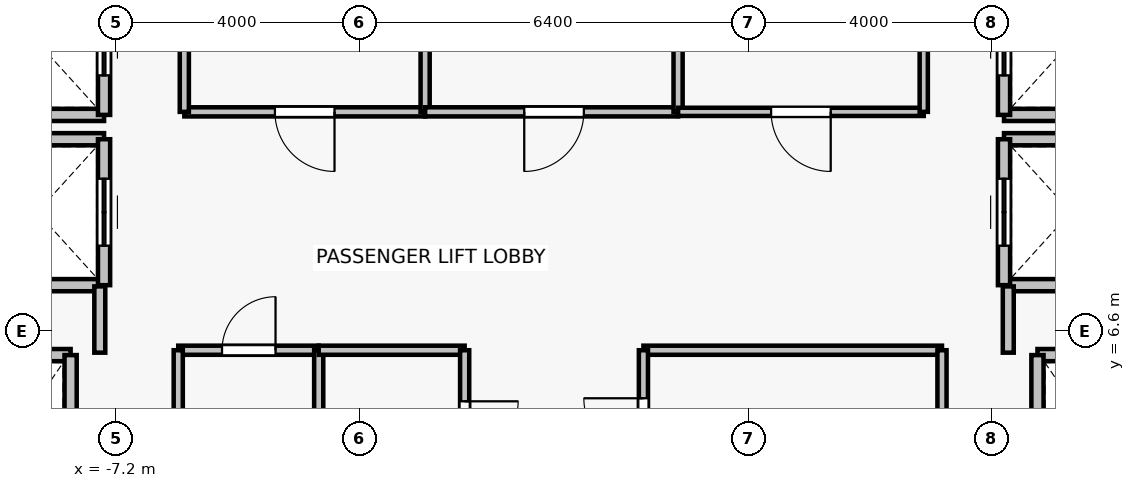
"""IFC4 building model, lengths in metres.
Left out: names, types, materials, properties, quantities, classifications, styles, units other than length and angle.
Written with IfcOpenShell. Run it as: python <this file> out.ifc"""

import sys

from ifc_helpers import new_model, si_unit, direction, frame, frame_2d, origin, place, context, subcontext, project, spatial, rectangle, extrude, source, transform, mapped, element, fill, save


model = new_model("IFC4")
c1 = context("Model", 3, precision=1e-05, world=origin(), true_north=direction((0.0, 1.0)))
c2 = subcontext(c1, "Body", "Model", "MODEL_VIEW")
j1 = project(units=[si_unit("LENGTHUNIT", "METRE"), si_unit("PLANEANGLEUNIT", "RADIAN")], contexts=[c1])
p1 = place(None, origin())
s1 = spatial("IfcSite", under=j1, at=p1, CompositionType="ELEMENT")
p2 = place(p1, origin())
s2 = spatial("IfcBuilding", under=s1, at=p2, CompositionType="ELEMENT")
p3 = place(p2, frame((0.0, 0.0, 241.9)))
s3 = spatial("IfcBuildingStorey", under=s2, at=p3, CompositionType="ELEMENT", Elevation=241.9)
p4 = place(p3, frame((-9.95, 6.2, 0.0), z_axis=(0.0, 0.0, 1.0), x_axis=(1.0, 0.0, 0.0)))
e1 = element("IfcWall", 1, at=p4, inside=s3, PredefinedType="SOLIDWALL", context=c2, shape_type="SweptSolid", body=[
    extrude(rectangle(XDim=2.0, YDim=0.2, at=frame_2d((1.0, 0.0))), origin(), (0.0, 0.0, 1.0), 3.075),
])
p5 = place(p3, frame((-7.95, 6.2, 0.0), z_axis=(0.0, 0.0, 1.0), x_axis=(0.0, -1.0, 0.0)))
e2 = element("IfcWall", 2, at=p5, inside=s3, PredefinedType="SOLIDWALL", context=c2, shape_type="SweptSolid", body=[
    extrude(rectangle(XDim=2.8, YDim=0.2, at=frame_2d((1.4, 0.0))), origin(), (0.0, 0.0, 1.0), 3.075),
])
p6 = place(p3, frame((7.95, 6.2, 0.0), z_axis=(0.0, 0.0, 1.0), x_axis=(1.0, 0.0, 0.0)))
e3 = element("IfcWall", 3, at=p6, inside=s3, PredefinedType="SOLIDWALL", context=c2, shape_type="SweptSolid", body=[
    extrude(rectangle(XDim=2.0, YDim=0.2, at=frame_2d((1.0, 0.0))), origin(), (0.0, 0.0, 1.0), 3.075),
])
p7 = place(p3, frame((7.95, 3.4, 0.0), z_axis=(0.0, 0.0, 1.0), x_axis=(0.0, 1.0, 0.0)))
e4 = element("IfcWall", 4, at=p7, inside=s3, PredefinedType="SOLIDWALL", context=c2, shape_type="SweptSolid", body=[
    extrude(rectangle(XDim=2.8, YDim=0.2, at=frame_2d((1.4, 0.0))), origin(), (0.0, 0.0, 1.0), 3.075),
])
for number, where, z_axis, x_axis in (
    (5, (-7.4, 7.35, 0.0), (0.0, 0.0, 1.0), (-1.0, 0.0, 0.0)),
    (6, (-9.6, 9.75, 0.0), (0.0, 0.0, 1.0), (1.0, 0.0, 0.0)),
):
    element("IfcWall", number, at=place(p3, frame(where, z_axis=z_axis, x_axis=x_axis)), inside=s3, PredefinedType="SOLIDWALL", context=c2, shape_type="SweptSolid", body=[
        extrude(rectangle(XDim=2.2, YDim=0.2, at=frame_2d((1.1, 0.0))), origin(), (0.0, 0.0, 1.0), 2.615),
    ])
p8 = place(p3, frame((-7.4, 9.75, 0.0), z_axis=(0.0, 0.0, 1.0), x_axis=(0.0, -1.0, 0.0)))
e7 = element("IfcWall", 7, at=p8, inside=s3, PredefinedType="SOLIDWALL", context=c2, shape_type="SweptSolid", body=[
    extrude(rectangle(XDim=2.4, YDim=0.2, at=frame_2d((1.2, 0.0))), origin(), (0.0, 0.0, 1.0), 2.615),
])
p9 = place(p8, frame((0.65, 0.0, 0.0)))
e8 = element("IfcOpeningElement", 8, at=p9, cuts=e7, PredefinedType="OPENING", context=c2, shape_type="SweptSolid", body=[
    extrude(rectangle(XDim=1.1, YDim=2.2, at=frame_2d((0.55, 1.1))), frame((0.0, 0.11, 0.0), z_axis=(0.0, -1.0, 0.0), x_axis=(1.0, 0.0, 0.0)), (0.0, 0.0, 1.0), 0.22),
])
p10 = place(p3, frame((-7.4, 10.15, 0.0), z_axis=(0.0, 0.0, 1.0), x_axis=(-1.0, 0.0, 0.0)))
e9 = element("IfcWall", 9, at=p10, inside=s3, PredefinedType="SOLIDWALL", context=c2, shape_type="SweptSolid", body=[
    extrude(rectangle(XDim=2.2, YDim=0.2, at=frame_2d((1.1, 0.0))), origin(), (0.0, 0.0, 1.0), 2.615),
])
p11 = place(p3, frame((-7.4, 12.55, 0.0), z_axis=(0.0, 0.0, 1.0), x_axis=(0.0, -1.0, 0.0)))
e10 = element("IfcWall", 10, at=p11, inside=s3, PredefinedType="SOLIDWALL", context=c2, shape_type="SweptSolid", body=[
    extrude(rectangle(XDim=2.4, YDim=0.2, at=frame_2d((1.2, 0.0))), origin(), (0.0, 0.0, 1.0), 2.615),
])
p12 = place(p11, frame((0.65, 0.0, 0.0)))
e11 = element("IfcOpeningElement", 11, at=p12, cuts=e10, PredefinedType="OPENING", context=c2, shape_type="SweptSolid", body=[
    extrude(rectangle(XDim=1.1, YDim=2.2, at=frame_2d((0.55, 1.1))), frame((0.0, 0.11, 0.0), z_axis=(0.0, -1.0, 0.0), x_axis=(1.0, 0.0, 0.0)), (0.0, 0.0, 1.0), 0.22),
])
for number, where, z_axis, x_axis in (
    (12, (9.6, 7.35, 0.0), (0.0, 0.0, 1.0), (-1.0, 0.0, 0.0)),
    (13, (7.4, 9.75, 0.0), (0.0, 0.0, 1.0), (1.0, 0.0, 0.0)),
):
    element("IfcWall", number, at=place(p3, frame(where, z_axis=z_axis, x_axis=x_axis)), inside=s3, PredefinedType="SOLIDWALL", context=c2, shape_type="SweptSolid", body=[
        extrude(rectangle(XDim=2.2, YDim=0.2, at=frame_2d((1.1, 0.0))), origin(), (0.0, 0.0, 1.0), 2.615),
    ])
p13 = place(p3, frame((7.4, 7.35, 0.0), z_axis=(0.0, 0.0, 1.0), x_axis=(0.0, 1.0, 0.0)))
e14 = element("IfcWall", 14, at=p13, inside=s3, PredefinedType="SOLIDWALL", context=c2, shape_type="SweptSolid", body=[
    extrude(rectangle(XDim=2.4, YDim=0.2, at=frame_2d((1.2, 0.0))), origin(), (0.0, 0.0, 1.0), 2.615),
])
p14 = place(p13, frame((0.65, 0.0, 0.0)))
e15 = element("IfcOpeningElement", 15, at=p14, cuts=e14, PredefinedType="OPENING", context=c2, shape_type="SweptSolid", body=[
    extrude(rectangle(XDim=1.1, YDim=2.2, at=frame_2d((0.55, 1.1))), frame((0.0, 0.11, 0.0), z_axis=(0.0, -1.0, 0.0), x_axis=(1.0, 0.0, 0.0)), (0.0, 0.0, 1.0), 0.22),
])
p15 = place(p3, frame((9.6, 10.15, 0.0), z_axis=(0.0, 0.0, 1.0), x_axis=(-1.0, 0.0, 0.0)))
e16 = element("IfcWall", 16, at=p15, inside=s3, PredefinedType="SOLIDWALL", context=c2, shape_type="SweptSolid", body=[
    extrude(rectangle(XDim=2.2, YDim=0.2, at=frame_2d((1.1, 0.0))), origin(), (0.0, 0.0, 1.0), 2.615),
])
p16 = place(p3, frame((7.4, 10.15, 0.0), z_axis=(0.0, 0.0, 1.0), x_axis=(0.0, 1.0, 0.0)))
e17 = element("IfcWall", 17, at=p16, inside=s3, PredefinedType="SOLIDWALL", context=c2, shape_type="SweptSolid", body=[
    extrude(rectangle(XDim=2.4, YDim=0.2, at=frame_2d((1.2, 0.0))), origin(), (0.0, 0.0, 1.0), 2.615),
])
p17 = place(p16, frame((0.65, 0.0, 0.0)))
e18 = element("IfcOpeningElement", 18, at=p17, cuts=e17, PredefinedType="OPENING", context=c2, shape_type="SweptSolid", body=[
    extrude(rectangle(XDim=1.1, YDim=2.2, at=frame_2d((0.55, 1.1))), frame((0.0, 0.11, 0.0), z_axis=(0.0, -1.0, 0.0), x_axis=(1.0, 0.0, 0.0)), (0.0, 0.0, 1.0), 0.22),
])
for number, where, z_axis, x_axis in (
    (19, (-7.47, 7.33, 0.0), (0.0, 0.0, 1.0), (0.0, -1.0, 0.0)),
    (20, (7.47, 6.24, 0.0), (0.0, 0.0, 1.0), (0.0, 1.0, 0.0)),
):
    element("IfcWall", number, at=place(p3, frame(where, z_axis=z_axis, x_axis=x_axis)), inside=s3, PredefinedType="PARTITIONING", context=c2, shape_type="SweptSolid", body=[
        extrude(rectangle(XDim=1.09, YDim=0.18, at=frame_2d((0.545, 0.0))), origin(), (0.0, 0.0, 1.0), 2.615),
    ])
p18 = place(p3, frame((-2.12, 10.2, 0.0), z_axis=(0.0, 0.0, 1.0), x_axis=(-1.0, 0.0, 0.0)))
e21 = element("IfcWall", 21, at=p18, inside=s3, PredefinedType="PARTITIONING", context=c2, shape_type="SweptSolid", body=[
    extrude(rectangle(XDim=3.96, YDim=0.15, at=frame_2d((1.98, 0.0))), origin(), (0.0, 0.0, 1.0), 3.075),
])
p19 = place(p18, frame((1.49, 0.0, 0.0)))
e22 = element("IfcOpeningElement", 22, at=p19, cuts=e21, PredefinedType="OPENING", context=c2, shape_type="SweptSolid", body=[
    extrude(rectangle(XDim=0.98, YDim=2.15, at=frame_2d((0.49, 1.075))), frame((0.0, 0.085, 0.0), z_axis=(0.0, -1.0, 0.0), x_axis=(1.0, 0.0, 0.0)), (0.0, 0.0, 1.0), 0.17),
])
for number, where, z_axis, x_axis in (
    (23, (-6.08, 10.2, 0.0), (0.0, 0.0, 1.0), (0.0, 1.0, 0.0)),
    (24, (-2.12, 13.0, 0.0), (0.0, 0.0, 1.0), (0.0, -1.0, 0.0)),
):
    element("IfcWall", number, at=place(p3, frame(where, z_axis=z_axis, x_axis=x_axis)), inside=s3, PredefinedType="PARTITIONING", context=c2, shape_type="SweptSolid", body=[
        extrude(rectangle(XDim=2.8, YDim=0.15, at=frame_2d((1.4, 0.0))), origin(), (0.0, 0.0, 1.0), 3.075),
    ])
p20 = place(p3, frame((2.04, 10.2, 0.0), z_axis=(0.0, 0.0, 1.0), x_axis=(-1.0, 0.0, 0.0)))
e25 = element("IfcWall", 25, at=p20, inside=s3, PredefinedType="PARTITIONING", context=c2, shape_type="SweptSolid", body=[
    extrude(rectangle(XDim=4.16, YDim=0.15, at=frame_2d((2.08, 0.0))), origin(), (0.0, 0.0, 1.0), 3.075),
])
p21 = place(p20, frame((1.55, 0.0, 0.0)))
e26 = element("IfcOpeningElement", 26, at=p21, cuts=e25, PredefinedType="OPENING", context=c2, shape_type="SweptSolid", body=[
    extrude(rectangle(XDim=0.98, YDim=2.15, at=frame_2d((0.49, 1.075))), frame((0.0, 0.085, 0.0), z_axis=(0.0, -1.0, 0.0), x_axis=(1.0, 0.0, 0.0)), (0.0, 0.0, 1.0), 0.17),
])
p22 = place(p3, frame((2.04, 13.0, 0.0), z_axis=(0.0, 0.0, 1.0), x_axis=(0.0, -1.0, 0.0)))
e27 = element("IfcWall", 27, at=p22, inside=s3, PredefinedType="PARTITIONING", context=c2, shape_type="SweptSolid", body=[
    extrude(rectangle(XDim=2.8, YDim=0.15, at=frame_2d((1.4, 0.0))), origin(), (0.0, 0.0, 1.0), 3.075),
])
p23 = place(p3, frame((6.08, 10.2, 0.0), z_axis=(0.0, 0.0, 1.0), x_axis=(-1.0, 0.0, 0.0)))
e28 = element("IfcWall", 28, at=p23, inside=s3, PredefinedType="PARTITIONING", context=c2, shape_type="SweptSolid", body=[
    extrude(rectangle(XDim=4.04, YDim=0.135, at=frame_2d((2.02, 0.0))), origin(), (0.0, 0.0, 1.0), 3.075),
])
p24 = place(p23, frame((1.53, 0.0, 0.0)))
e29 = element("IfcOpeningElement", 29, at=p24, cuts=e28, PredefinedType="OPENING", context=c2, shape_type="SweptSolid", body=[
    extrude(rectangle(XDim=0.98, YDim=2.15, at=frame_2d((0.49, 1.075))), frame((0.0, 0.077, 0.0), z_axis=(0.0, -1.0, 0.0), x_axis=(1.0, 0.0, 0.0)), (0.0, 0.0, 1.0), 0.155),
])
p25 = place(p3, frame((6.08, 13.0, 0.0), z_axis=(0.0, 0.0, 1.0), x_axis=(0.0, -1.0, 0.0)))
e30 = element("IfcWall", 30, at=p25, inside=s3, PredefinedType="PARTITIONING", context=c2, shape_type="SweptSolid", body=[
    extrude(rectangle(XDim=2.8, YDim=0.135, at=frame_2d((1.4, 0.0))), origin(), (0.0, 0.0, 1.0), 3.075),
])
p26 = place(p3, frame((-6.18, 6.28, 0.0), z_axis=(0.0, 0.0, 1.0), x_axis=(1.0, 0.0, 0.0)))
e31 = element("IfcWall", 31, at=p26, inside=s3, PredefinedType="PARTITIONING", context=c2, shape_type="SweptSolid", body=[
    extrude(rectangle(XDim=2.31, YDim=0.15, at=frame_2d((1.155, 0.0))), origin(), (0.0, 0.0, 1.0), 3.075),
])
p27 = place(p26, frame((0.72, 0.0, 0.0)))
e32 = element("IfcOpeningElement", 32, at=p27, cuts=e31, PredefinedType="OPENING", context=c2, shape_type="SweptSolid", body=[
    extrude(rectangle(XDim=0.88, YDim=2.1, at=frame_2d((0.44, 1.05))), frame((0.0, 0.085, 0.0), z_axis=(0.0, -1.0, 0.0), x_axis=(1.0, 0.0, 0.0)), (0.0, 0.0, 1.0), 0.17),
])
for number, where, z_axis, x_axis in (
    (33, (-6.18, 3.76, 0.0), (0.0, 0.0, 1.0), (0.0, 1.0, 0.0)),
    (34, (-3.87, 6.28, 0.0), (0.0, 0.0, 1.0), (0.0, -1.0, 0.0)),
):
    element("IfcWall", number, at=place(p3, frame(where, z_axis=z_axis, x_axis=x_axis)), inside=s3, PredefinedType="PARTITIONING", context=c2, shape_type="SweptSolid", body=[
        extrude(rectangle(XDim=2.52, YDim=0.15, at=frame_2d((1.26, 0.0))), origin(), (0.0, 0.0, 1.0), 3.075),
    ])
p28 = place(p3, frame((-3.87, 6.28, 0.0), z_axis=(0.0, 0.0, 1.0), x_axis=(1.0, 0.0, 0.0)))
e35 = element("IfcWall", 35, at=p28, inside=s3, PredefinedType="PARTITIONING", context=c2, shape_type="SweptSolid", body=[
    extrude(rectangle(XDim=2.4, YDim=0.15, at=frame_2d((1.2, 0.0))), origin(), (0.0, 0.0, 1.0), 3.075),
])
p29 = place(p3, frame((-1.47, 6.28, 0.0), z_axis=(0.0, 0.0, 1.0), x_axis=(0.0, -1.0, 0.0)))
e36 = element("IfcWall", 36, at=p29, inside=s3, PredefinedType="PARTITIONING", context=c2, shape_type="SweptSolid", body=[
    extrude(rectangle(XDim=2.52, YDim=0.15, at=frame_2d((1.26, 0.0))), origin(), (0.0, 0.0, 1.0), 3.075),
])
p30 = place(p29, frame((0.84, 0.0, 0.0)))
e37 = element("IfcOpeningElement", 37, at=p30, cuts=e36, PredefinedType="OPENING", context=c2, shape_type="SweptSolid", body=[
    extrude(rectangle(XDim=0.88, YDim=2.1, at=frame_2d((0.44, 1.05))), frame((0.0, 0.085, 0.0), z_axis=(0.0, -1.0, 0.0), x_axis=(1.0, 0.0, 0.0)), (0.0, 0.0, 1.0), 0.17),
])
p31 = place(p3, frame((1.47, 6.28, 0.0), z_axis=(0.0, 0.0, 1.0), x_axis=(1.0, 0.0, 0.0)))
e38 = element("IfcWall", 38, at=p31, inside=s3, PredefinedType="PARTITIONING", context=c2, shape_type="SweptSolid", body=[
    extrude(rectangle(XDim=4.91, YDim=0.15, at=frame_2d((2.455, 0.0))), origin(), (0.0, 0.0, 1.0), 3.075),
])
p32 = place(p3, frame((1.47, 3.76, 0.0), z_axis=(0.0, 0.0, 1.0), x_axis=(0.0, 1.0, 0.0)))
e39 = element("IfcWall", 39, at=p32, inside=s3, PredefinedType="PARTITIONING", context=c2, shape_type="SweptSolid", body=[
    extrude(rectangle(XDim=2.52, YDim=0.15, at=frame_2d((1.26, 0.0))), origin(), (0.0, 0.0, 1.0), 3.075),
])
p33 = place(p32, frame((0.75, 0.0, 0.0)))
e40 = element("IfcOpeningElement", 40, at=p33, cuts=e39, PredefinedType="OPENING", context=c2, shape_type="SweptSolid", body=[
    extrude(rectangle(XDim=0.98, YDim=2.15, at=frame_2d((0.49, 1.075))), frame((0.0, 0.085, 0.0), z_axis=(0.0, -1.0, 0.0), x_axis=(1.0, 0.0, 0.0)), (0.0, 0.0, 1.0), 0.17),
])
p34 = place(p3, frame((6.38, 6.28, 0.0), z_axis=(0.0, 0.0, 1.0), x_axis=(0.0, -1.0, 0.0)))
e41 = element("IfcWall", 41, at=p34, inside=s3, PredefinedType="PARTITIONING", context=c2, shape_type="SweptSolid", body=[
    extrude(rectangle(XDim=2.52, YDim=0.15, at=frame_2d((1.26, 0.0))), origin(), (0.0, 0.0, 1.0), 3.075),
])
m1 = source(origin(), c2, "Body", "SweptSolid", [
    extrude(rectangle(XDim=1.1, YDim=2.2, at=frame_2d((0.55, 1.1))), frame((0.0, 0.025, 0.0), z_axis=(0.0, -1.0, 0.0), x_axis=(1.0, 0.0, 0.0)), (0.0, 0.0, 1.0), 0.05),
])
p35 = place(p9, origin())
e42 = element("IfcDoor", 42, at=p35, inside=s3, OperationType="DOUBLE_DOOR_SLIDING", PredefinedType="DOOR", context=c2, shape_type="MappedRepresentation", body=[
    mapped(m1, transform((0.0, 0.0, 0.0), x_axis=(1.0, 0.0, 0.0), y_axis=(0.0, 1.0, 0.0), z_axis=(0.0, 0.0, 1.0), scale=1.0)),
])
fill(e8, e42)
p36 = place(p12, origin())
e43 = element("IfcDoor", 43, at=p36, inside=s3, OperationType="DOUBLE_DOOR_SLIDING", PredefinedType="DOOR", context=c2, shape_type="MappedRepresentation", body=[
    mapped(m1, transform((0.0, 0.0, 0.0), x_axis=(1.0, 0.0, 0.0), y_axis=(0.0, 1.0, 0.0), z_axis=(0.0, 0.0, 1.0), scale=1.0)),
])
fill(e11, e43)
p37 = place(p14, origin())
e44 = element("IfcDoor", 44, at=p37, inside=s3, OperationType="DOUBLE_DOOR_SLIDING", PredefinedType="DOOR", context=c2, shape_type="MappedRepresentation", body=[
    mapped(m1, transform((0.0, 0.0, 0.0), x_axis=(1.0, 0.0, 0.0), y_axis=(0.0, 1.0, 0.0), z_axis=(0.0, 0.0, 1.0), scale=1.0)),
])
fill(e15, e44)
p38 = place(p17, origin())
e45 = element("IfcDoor", 45, at=p38, inside=s3, OperationType="DOUBLE_DOOR_SLIDING", PredefinedType="DOOR", context=c2, shape_type="MappedRepresentation", body=[
    mapped(m1, transform((0.0, 0.0, 0.0), x_axis=(1.0, 0.0, 0.0), y_axis=(0.0, 1.0, 0.0), z_axis=(0.0, 0.0, 1.0), scale=1.0)),
])
fill(e18, e45)
m2 = source(origin(), c2, "Body", "SweptSolid", [
    extrude(rectangle(XDim=0.98, YDim=2.15, at=frame_2d((0.49, 1.075))), frame((0.0, 0.025, 0.0), z_axis=(0.0, -1.0, 0.0), x_axis=(1.0, 0.0, 0.0)), (0.0, 0.0, 1.0), 0.05),
])
p39 = place(p19, origin())
e46 = element("IfcDoor", 46, at=p39, inside=s3, OperationType="SINGLE_SWING_LEFT", PredefinedType="DOOR", context=c2, shape_type="MappedRepresentation", body=[
    mapped(m2, transform((0.0, 0.0, 0.0), x_axis=(1.0, 0.0, 0.0), y_axis=(0.0, 1.0, 0.0), z_axis=(0.0, 0.0, 1.0), scale=1.0)),
])
fill(e22, e46)
p40 = place(p21, origin())
e47 = element("IfcDoor", 47, at=p40, inside=s3, OperationType="SINGLE_SWING_RIGHT", PredefinedType="DOOR", context=c2, shape_type="MappedRepresentation", body=[
    mapped(m2, transform((0.0, 0.0, 0.0), x_axis=(1.0, 0.0, 0.0), y_axis=(0.0, 1.0, 0.0), z_axis=(0.0, 0.0, 1.0), scale=1.0)),
])
fill(e26, e47)
p41 = place(p24, origin())
e48 = element("IfcDoor", 48, at=p41, inside=s3, OperationType="SINGLE_SWING_LEFT", PredefinedType="DOOR", context=c2, shape_type="MappedRepresentation", body=[
    mapped(m2, transform((0.0, 0.0, 0.0), x_axis=(1.0, 0.0, 0.0), y_axis=(0.0, 1.0, 0.0), z_axis=(0.0, 0.0, 1.0), scale=1.0)),
])
fill(e29, e48)
m3 = source(origin(), c2, "Body", "SweptSolid", [
    extrude(rectangle(XDim=0.88, YDim=2.1, at=frame_2d((0.44, 1.05))), frame((0.0, 0.025, 0.0), z_axis=(0.0, -1.0, 0.0), x_axis=(1.0, 0.0, 0.0)), (0.0, 0.0, 1.0), 0.05),
])
p42 = place(p27, origin())
e49 = element("IfcDoor", 49, at=p42, inside=s3, OperationType="SINGLE_SWING_RIGHT", PredefinedType="DOOR", context=c2, shape_type="MappedRepresentation", body=[
    mapped(m3, transform((0.0, 0.0, 0.0), x_axis=(1.0, 0.0, 0.0), y_axis=(0.0, 1.0, 0.0), z_axis=(0.0, 0.0, 1.0), scale=1.0)),
])
fill(e32, e49)
p43 = place(p30, origin())
e50 = element("IfcDoor", 50, at=p43, inside=s3, OperationType="SINGLE_SWING_LEFT", PredefinedType="DOOR", context=c2, shape_type="MappedRepresentation", body=[
    mapped(m3, transform((0.0, 0.0, 0.0), x_axis=(1.0, 0.0, 0.0), y_axis=(0.0, 1.0, 0.0), z_axis=(0.0, 0.0, 1.0), scale=1.0)),
])
fill(e37, e50)
p44 = place(p33, origin())
e51 = element("IfcDoor", 51, at=p44, inside=s3, OperationType="SINGLE_SWING_RIGHT", PredefinedType="DOOR", context=c2, shape_type="MappedRepresentation", body=[
    mapped(m2, transform((0.0, 0.0, 0.0), x_axis=(1.0, 0.0, 0.0), y_axis=(0.0, 1.0, 0.0), z_axis=(0.0, 0.0, 1.0), scale=1.0)),
])
fill(e40, e51)
save(model, sys.argv[1])
